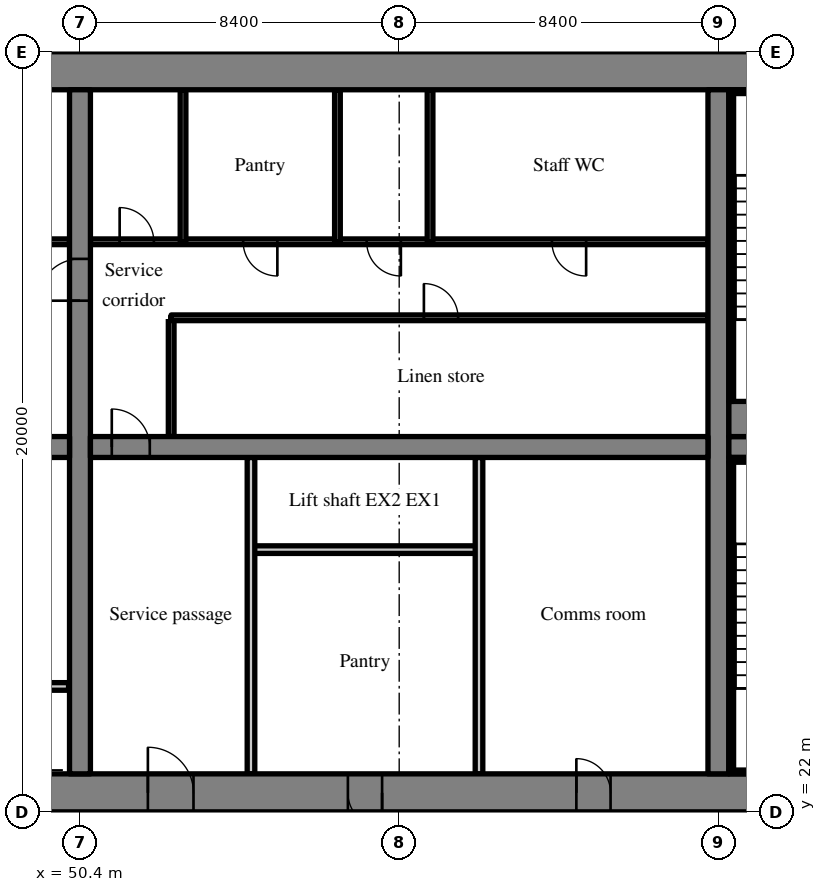
"""IFC4 building model, lengths in metres.
Left out: names, types, materials, properties, quantities, classifications, styles, units other than length and angle.
Written with IfcOpenShell. Run it as: python <this file> out.ifc"""

import sys

from ifc_helpers import new_model, si_unit, direction, frame, frame_2d, origin, place, context, subcontext, project, spatial, rectangle, extrude, source, transform, mapped, element, fill, save


model = new_model("IFC4")
c1 = context("Model", 3, precision=1e-05, world=origin(), true_north=direction((0.0, 1.0)))
c2 = subcontext(c1, "Body", "Model", "MODEL_VIEW")
j1 = project(units=[si_unit("LENGTHUNIT", "METRE"), si_unit("PLANEANGLEUNIT", "RADIAN")], contexts=[c1])
p1 = place(None, origin())
s1 = spatial("IfcSite", under=j1, at=p1, CompositionType="ELEMENT")
p2 = place(p1, origin())
s2 = spatial("IfcBuilding", under=s1, at=p2, CompositionType="ELEMENT")
p3 = place(p2, frame((0.0, 0.0, 73.4)))
s3 = spatial("IfcBuildingStorey", under=s2, at=p3, CompositionType="ELEMENT", Elevation=73.4)
m1 = source(origin(), c2, "Body", "SweptSolid", [
    extrude(rectangle(XDim=50.4, YDim=1.0, at=frame_2d((25.2, 0.0))), origin(), (0.0, 0.0, 1.0), 3.52),
])
p4 = place(p3, frame((25.2, 22.5, 0.0), z_axis=(0.0, 0.0, 1.0), x_axis=(1.0, 0.0, 0.0)))
e1 = element("IfcWall", 1, at=p4, inside=s3, PredefinedType="SHEAR", context=c2, shape_type="MappedRepresentation", body=[
    mapped(m1, transform((0.0, 0.0, 0.0), scale=1.0)),
])
m2 = source(origin(), c2, "Body", "SweptSolid", [
    extrude(rectangle(XDim=1.8, YDim=2.1, at=frame_2d((0.9, 1.05))), frame((0.0, 0.51, 0.0), z_axis=(0.0, -1.0, 0.0), x_axis=(1.0, 0.0, 0.0)), (0.0, 0.0, 1.0), 1.02),
])
p5 = place(p4, frame((15.9, 0.0, 0.0)))
e2 = element("IfcOpeningElement", 2, at=p5, cuts=e1, PredefinedType="OPENING", context=c2, shape_type="MappedRepresentation", body=[
    mapped(m2, transform((0.0, 0.0, 0.0), scale=1.0)),
])
m3 = source(origin(), c2, "Body", "SweptSolid", [
    extrude(rectangle(XDim=1.2, YDim=2.1, at=frame_2d((0.6, 1.05))), frame((0.0, 0.51, 0.0), z_axis=(0.0, -1.0, 0.0), x_axis=(1.0, 0.0, 0.0)), (0.0, 0.0, 1.0), 1.02),
])
p6 = place(p4, frame((26.987, 0.0, 0.0)))
e3 = element("IfcOpeningElement", 3, at=p6, cuts=e1, PredefinedType="OPENING", context=c2, shape_type="MappedRepresentation", body=[
    mapped(m3, transform((0.0, 0.0, 0.0), scale=1.0)),
])
m4 = source(origin(), c2, "Body", "SweptSolid", [
    extrude(rectangle(XDim=0.9, YDim=2.1, at=frame_2d((0.45, 1.05))), frame((0.0, 0.51, 0.0), z_axis=(0.0, -1.0, 0.0), x_axis=(1.0, 0.0, 0.0)), (0.0, 0.0, 1.0), 1.02),
])
p7 = place(p4, frame((32.25, 0.0, 0.0)))
e4 = element("IfcOpeningElement", 4, at=p7, cuts=e1, PredefinedType="OPENING", context=c2, shape_type="MappedRepresentation", body=[
    mapped(m4, transform((0.0, 0.0, 0.0), scale=1.0)),
])
p8 = place(p4, frame((38.262, 0.0, 0.0)))
e5 = element("IfcOpeningElement", 5, at=p8, cuts=e1, PredefinedType="OPENING", context=c2, shape_type="MappedRepresentation", body=[
    mapped(m4, transform((0.0, 0.0, 0.0), scale=1.0)),
])
p9 = place(p4, frame((6.438, 0.0, 0.0)))
e6 = element("IfcOpeningElement", 6, at=p9, cuts=e1, PredefinedType="OPENING", context=c2, shape_type="MappedRepresentation", body=[
    mapped(m3, transform((0.0, 0.0, 0.0), scale=1.0)),
])
p10 = place(p4, frame((47.725, 0.0, 0.0)))
e7 = element("IfcOpeningElement", 7, at=p10, cuts=e1, PredefinedType="OPENING", context=c2, shape_type="MappedRepresentation", body=[
    mapped(m3, transform((0.0, 0.0, 0.0), scale=1.0)),
])
p11 = place(p3, frame((25.2, 41.5, 0.0), z_axis=(0.0, 0.0, 1.0), x_axis=(1.0, 0.0, 0.0)))
e8 = element("IfcWall", 8, at=p11, inside=s3, PredefinedType="SHEAR", context=c2, shape_type="MappedRepresentation", body=[
    mapped(m1, transform((0.0, 0.0, 0.0), scale=1.0)),
])
m5 = source(origin(), c2, "Body", "SweptSolid", [
    extrude(rectangle(XDim=18.0, YDim=0.55, at=frame_2d((9.0, 0.0))), origin(), (0.0, 0.0, 1.0), 3.52),
])
p12 = place(p3, frame((50.4, 23.0, 0.0), z_axis=(0.0, 0.0, 1.0), x_axis=(0.0, 1.0, 0.0)))
e9 = element("IfcWall", 9, at=p12, inside=s3, PredefinedType="SHEAR", context=c2, shape_type="MappedRepresentation", body=[
    mapped(m5, transform((0.0, 0.0, 0.0), scale=1.0)),
])
m6 = source(origin(), c2, "Body", "SweptSolid", [
    extrude(rectangle(XDim=1.1, YDim=2.1, at=frame_2d((0.55, 1.05))), frame((0.0, 0.285, 0.0), z_axis=(0.0, -1.0, 0.0), x_axis=(1.0, 0.0, 0.0)), (0.0, 0.0, 1.0), 0.57),
])
p13 = place(p12, frame((12.45, 0.0, 0.0)))
e10 = element("IfcOpeningElement", 10, at=p13, cuts=e9, PredefinedType="OPENING", context=c2, shape_type="MappedRepresentation", body=[
    mapped(m6, transform((0.0, 0.0, 0.0), scale=1.0)),
])
p14 = place(p3, frame((67.2, 23.0, 0.0), z_axis=(0.0, 0.0, 1.0), x_axis=(0.0, 1.0, 0.0)))
e11 = element("IfcWall", 11, at=p14, inside=s3, PredefinedType="SHEAR", context=c2, shape_type="MappedRepresentation", body=[
    mapped(m5, transform((0.0, 0.0, 0.0), scale=1.0)),
])
m7 = source(origin(), c2, "Body", "SweptSolid", [
    extrude(rectangle(XDim=16.25, YDim=0.55, at=frame_2d((8.125, 0.0))), origin(), (0.0, 0.0, 1.0), 3.52),
])
p15 = place(p3, frame((33.875, 31.6, 0.0), z_axis=(0.0, 0.0, 1.0), x_axis=(1.0, 0.0, 0.0)))
e12 = element("IfcWall", 12, at=p15, inside=s3, PredefinedType="SHEAR", context=c2, shape_type="MappedRepresentation", body=[
    mapped(m7, transform((0.0, 0.0, 0.0), scale=1.0)),
])
m8 = source(origin(), c2, "Body", "SweptSolid", [
    extrude(rectangle(XDim=1.0, YDim=2.1, at=frame_2d((0.5, 1.05))), frame((0.0, 0.285, 0.0), z_axis=(0.0, -1.0, 0.0), x_axis=(1.0, 0.0, 0.0)), (0.0, 0.0, 1.0), 0.57),
])
p16 = place(p15, frame((14.687, 0.0, 0.0)))
e13 = element("IfcOpeningElement", 13, at=p16, cuts=e12, PredefinedType="OPENING", context=c2, shape_type="MappedRepresentation", body=[
    mapped(m8, transform((0.0, 0.0, 0.0), scale=1.0)),
])
p17 = place(p3, frame((50.675, 31.6, 0.0), z_axis=(0.0, 0.0, 1.0), x_axis=(1.0, 0.0, 0.0)))
e14 = element("IfcWall", 14, at=p17, inside=s3, PredefinedType="SHEAR", context=c2, shape_type="MappedRepresentation", body=[
    mapped(m7, transform((0.0, 0.0, 0.0), scale=1.0)),
])
p18 = place(p17, frame((0.562, 0.0, 0.0)))
e15 = element("IfcOpeningElement", 15, at=p18, cuts=e14, PredefinedType="OPENING", context=c2, shape_type="MappedRepresentation", body=[
    mapped(m8, transform((0.0, 0.0, 0.0), scale=1.0)),
])
m9 = source(origin(), c2, "Body", "SweptSolid", [
    extrude(rectangle(XDim=7.125, YDim=0.55, at=frame_2d((3.562, 0.0))), origin(), (0.0, 0.0, 1.0), 3.52),
])
p19 = place(p3, frame((67.475, 31.6, 0.0), z_axis=(0.0, 0.0, 1.0), x_axis=(1.0, 0.0, 0.0)))
e16 = element("IfcWall", 16, at=p19, inside=s3, PredefinedType="SHEAR", context=c2, shape_type="MappedRepresentation", body=[
    mapped(m9, transform((0.0, 0.0, 0.0), scale=1.0)),
])
p20 = place(p19, frame((5.5, 0.0, 0.0)))
e17 = element("IfcOpeningElement", 17, at=p20, cuts=e16, PredefinedType="OPENING", context=c2, shape_type="MappedRepresentation", body=[
    mapped(m6, transform((0.0, 0.0, 0.0), scale=1.0)),
])
m10 = source(origin(), c2, "Body", "SweptSolid", [
    extrude(rectangle(XDim=6.0, YDim=0.2, at=frame_2d((3.0, 0.0))), origin(), (0.0, 0.0, 1.0), 3.52),
])
p21 = place(p3, frame((44.1, 25.3, 0.0), z_axis=(0.0, 0.0, 1.0), x_axis=(1.0, 0.0, 0.0)))
e18 = element("IfcWall", 18, at=p21, inside=s3, PredefinedType="SOLIDWALL", context=c2, shape_type="MappedRepresentation", body=[
    mapped(m10, transform((0.0, 0.0, 0.0), scale=1.0)),
])
m11 = source(origin(), c2, "Body", "SweptSolid", [
    extrude(rectangle(XDim=1.1, YDim=2.1, at=frame_2d((0.55, 1.05))), frame((0.0, 0.11, 0.0), z_axis=(0.0, -1.0, 0.0), x_axis=(1.0, 0.0, 0.0)), (0.0, 0.0, 1.0), 0.22),
])
p22 = place(p21, frame((0.95, 0.0, 0.0)))
e19 = element("IfcOpeningElement", 19, at=p22, cuts=e18, PredefinedType="OPENING", context=c2, shape_type="MappedRepresentation", body=[
    mapped(m11, transform((0.0, 0.0, 0.0), scale=1.0)),
])
p23 = place(p21, frame((3.95, 0.0, 0.0)))
e20 = element("IfcOpeningElement", 20, at=p23, cuts=e18, PredefinedType="OPENING", context=c2, shape_type="MappedRepresentation", body=[
    mapped(m11, transform((0.0, 0.0, 0.0), scale=1.0)),
])
m12 = source(origin(), c2, "Body", "SweptSolid", [
    extrude(rectangle(XDim=16.25, YDim=0.15, at=frame_2d((8.125, 0.0))), origin(), (0.0, 0.0, 1.0), 3.52),
])
p24 = place(p3, frame((33.875, 37.0, 0.0), z_axis=(0.0, 0.0, 1.0), x_axis=(1.0, 0.0, 0.0)))
e21 = element("IfcWall", 21, at=p24, inside=s3, PredefinedType="PARTITIONING", context=c2, shape_type="MappedRepresentation", body=[
    mapped(m12, transform((0.0, 0.0, 0.0), scale=1.0)),
])
m13 = source(origin(), c2, "Body", "SweptSolid", [
    extrude(rectangle(XDim=0.9, YDim=2.1, at=frame_2d((0.45, 1.05))), frame((0.0, 0.085, 0.0), z_axis=(0.0, -1.0, 0.0), x_axis=(1.0, 0.0, 0.0)), (0.0, 0.0, 1.0), 0.17),
])
p25 = place(p24, frame((1.581, 0.0, 0.0)))
e22 = element("IfcOpeningElement", 22, at=p25, cuts=e21, PredefinedType="OPENING", context=c2, shape_type="MappedRepresentation", body=[
    mapped(m13, transform((0.0, 0.0, 0.0), scale=1.0)),
])
p26 = place(p24, frame((7.269, 0.0, 0.0)))
e23 = element("IfcOpeningElement", 23, at=p26, cuts=e21, PredefinedType="OPENING", context=c2, shape_type="MappedRepresentation", body=[
    mapped(m13, transform((0.0, 0.0, 0.0), scale=1.0)),
])
p27 = place(p24, frame((12.144, 0.0, 0.0)))
e24 = element("IfcOpeningElement", 24, at=p27, cuts=e21, PredefinedType="OPENING", context=c2, shape_type="MappedRepresentation", body=[
    mapped(m13, transform((0.0, 0.0, 0.0), scale=1.0)),
])
p28 = place(p24, frame((14.581, 0.0, 0.0)))
e25 = element("IfcOpeningElement", 25, at=p28, cuts=e21, PredefinedType="OPENING", context=c2, shape_type="MappedRepresentation", body=[
    mapped(m13, transform((0.0, 0.0, 0.0), scale=1.0)),
])
p29 = place(p3, frame((60.9, 28.9, 0.0), z_axis=(0.0, 0.0, 1.0), x_axis=(-1.0, 0.0, 0.0)))
e26 = element("IfcWall", 26, at=p29, inside=s3, PredefinedType="SOLIDWALL", context=c2, shape_type="MappedRepresentation", body=[
    mapped(m10, transform((0.0, 0.0, 0.0), scale=1.0)),
])
m14 = source(origin(), c2, "Body", "SweptSolid", [
    extrude(rectangle(XDim=8.325, YDim=0.2, at=frame_2d((4.163, 0.0))), origin(), (0.0, 0.0, 1.0), 3.52),
])
for number, where, z_axis, x_axis in (
    (27, (54.9, 23.0, 0.0), (0.0, 0.0, 1.0), (0.0, 1.0, 0.0)),
    (28, (60.9, 23.0, 0.0), (0.0, 0.0, 1.0), (0.0, 1.0, 0.0)),
):
    element("IfcWall", number, at=place(p3, frame(where, z_axis=z_axis, x_axis=x_axis)), inside=s3, PredefinedType="PARTITIONING", context=c2, shape_type="MappedRepresentation", body=[
        mapped(m14, transform((0.0, 0.0, 0.0), scale=1.0)),
    ])
m15 = source(origin(), c2, "Body", "SweptSolid", [
    extrude(rectangle(XDim=3.125, YDim=0.15, at=frame_2d((1.562, 0.0))), origin(), (0.0, 0.0, 1.0), 3.52),
])
p30 = place(p3, frame((52.8, 31.875, 0.0), z_axis=(0.0, 0.0, 1.0), x_axis=(0.0, 1.0, 0.0)))
e29 = element("IfcWall", 29, at=p30, inside=s3, PredefinedType="PARTITIONING", context=c2, shape_type="MappedRepresentation", body=[
    mapped(m15, transform((0.0, 0.0, 0.0), scale=1.0)),
])
m16 = source(origin(), c2, "Body", "SweptSolid", [
    extrude(rectangle(XDim=14.125, YDim=0.15, at=frame_2d((7.062, 0.0))), origin(), (0.0, 0.0, 1.0), 3.52),
])
p31 = place(p3, frame((66.925, 35.0, 0.0), z_axis=(0.0, 0.0, 1.0), x_axis=(-1.0, 0.0, 0.0)))
e30 = element("IfcWall", 30, at=p31, inside=s3, PredefinedType="PARTITIONING", context=c2, shape_type="MappedRepresentation", body=[
    mapped(m16, transform((0.0, 0.0, 0.0), scale=1.0)),
])
p32 = place(p31, frame((6.575, 0.0, 0.0)))
e31 = element("IfcOpeningElement", 31, at=p32, cuts=e30, PredefinedType="OPENING", context=c2, shape_type="MappedRepresentation", body=[
    mapped(m13, transform((0.0, 0.0, 0.0), scale=1.0)),
])
p33 = place(p3, frame((66.925, 37.0, 0.0), z_axis=(0.0, 0.0, 1.0), x_axis=(-1.0, 0.0, 0.0)))
e32 = element("IfcWall", 32, at=p33, inside=s3, PredefinedType="PARTITIONING", context=c2, shape_type="MappedRepresentation", body=[
    mapped(m12, transform((0.0, 0.0, 0.0), scale=1.0)),
])
p34 = place(p33, frame((3.206, 0.0, 0.0)))
e33 = element("IfcOpeningElement", 33, at=p34, cuts=e32, PredefinedType="OPENING", context=c2, shape_type="MappedRepresentation", body=[
    mapped(m13, transform((0.0, 0.0, 0.0), scale=1.0)),
])
p35 = place(p33, frame((8.081, 0.0, 0.0)))
e34 = element("IfcOpeningElement", 34, at=p35, cuts=e32, PredefinedType="OPENING", context=c2, shape_type="MappedRepresentation", body=[
    mapped(m13, transform((0.0, 0.0, 0.0), scale=1.0)),
])
p36 = place(p33, frame((11.331, 0.0, 0.0)))
e35 = element("IfcOpeningElement", 35, at=p36, cuts=e32, PredefinedType="OPENING", context=c2, shape_type="MappedRepresentation", body=[
    mapped(m13, transform((0.0, 0.0, 0.0), scale=1.0)),
])
p37 = place(p33, frame((14.581, 0.0, 0.0)))
e36 = element("IfcOpeningElement", 36, at=p37, cuts=e32, PredefinedType="OPENING", context=c2, shape_type="MappedRepresentation", body=[
    mapped(m13, transform((0.0, 0.0, 0.0), scale=1.0)),
])
m17 = source(origin(), c2, "Body", "SweptSolid", [
    extrude(rectangle(XDim=4.0, YDim=0.15, at=frame_2d((2.0, 0.0))), origin(), (0.0, 0.0, 1.0), 3.52),
])
for number, where, z_axis, x_axis in (
    (37, (59.612, 37.0, 0.0), (0.0, 0.0, 1.0), (0.0, 1.0, 0.0)),
    (38, (57.175, 37.0, 0.0), (0.0, 0.0, 1.0), (0.0, 1.0, 0.0)),
    (39, (53.112, 37.0, 0.0), (0.0, 0.0, 1.0), (0.0, 1.0, 0.0)),
):
    element("IfcWall", number, at=place(p3, frame(where, z_axis=z_axis, x_axis=x_axis)), inside=s3, PredefinedType="PARTITIONING", context=c2, shape_type="MappedRepresentation", body=[
        mapped(m17, transform((0.0, 0.0, 0.0), scale=1.0)),
    ])
m18 = source(origin(), c2, "Body", "SweptSolid", [
    extrude(rectangle(XDim=4.775, YDim=0.1, at=frame_2d((2.387, 0.0))), origin(), (0.0, 0.0, 1.0), 3.52),
])
p38 = place(p3, frame((67.475, 23.05, 0.0), z_axis=(0.0, 0.0, 1.0), x_axis=(1.0, 0.0, 0.0)))
e40 = element("IfcWall", 40, at=p38, inside=s3, PredefinedType="SOLIDWALL", context=c2, shape_type="MappedRepresentation", body=[
    mapped(m18, transform((0.0, 0.0, 0.0), scale=1.0)),
])
m19 = source(origin(), c2, "Body", "SweptSolid", [
    extrude(rectangle(XDim=4.775, YDim=0.125, at=frame_2d((2.387, 0.0))), origin(), (0.0, 0.0, 1.0), 3.52),
])
p39 = place(p3, frame((67.475, 31.262, 0.0), z_axis=(0.0, 0.0, 1.0), x_axis=(1.0, 0.0, 0.0)))
e41 = element("IfcWall", 41, at=p39, inside=s3, PredefinedType="SOLIDWALL", context=c2, shape_type="MappedRepresentation", body=[
    mapped(m19, transform((0.0, 0.0, 0.0), scale=1.0)),
])
m20 = source(origin(), c2, "Body", "SweptSolid", [
    extrude(rectangle(XDim=8.1, YDim=0.125, at=frame_2d((4.05, 0.0))), origin(), (0.0, 0.0, 1.0), 3.52),
])
p40 = place(p3, frame((67.537, 23.1, 0.0), z_axis=(0.0, 0.0, 1.0), x_axis=(0.0, 1.0, 0.0)))
e42 = element("IfcWall", 42, at=p40, inside=s3, PredefinedType="SOLIDWALL", context=c2, shape_type="MappedRepresentation", body=[
    mapped(m20, transform((0.0, 0.0, 0.0), scale=1.0)),
])
p41 = place(p3, frame((67.475, 40.95, 0.0), z_axis=(0.0, 0.0, 1.0), x_axis=(1.0, 0.0, 0.0)))
e43 = element("IfcWall", 43, at=p41, inside=s3, PredefinedType="SOLIDWALL", context=c2, shape_type="MappedRepresentation", body=[
    mapped(m18, transform((0.0, 0.0, 0.0), scale=1.0)),
])
m21 = source(origin(), c2, "Body", "SweptSolid", [
    extrude(rectangle(XDim=4.775, YDim=0.925, at=frame_2d((2.387, 0.0))), origin(), (0.0, 0.0, 1.0), 3.52),
])
p42 = place(p3, frame((67.475, 32.337, 0.0), z_axis=(0.0, 0.0, 1.0), x_axis=(1.0, 0.0, 0.0)))
e44 = element("IfcWall", 44, at=p42, inside=s3, PredefinedType="SOLIDWALL", context=c2, shape_type="MappedRepresentation", body=[
    mapped(m21, transform((0.0, 0.0, 0.0), scale=1.0)),
])
p43 = place(p3, frame((67.537, 32.8, 0.0), z_axis=(0.0, 0.0, 1.0), x_axis=(0.0, 1.0, 0.0)))
e45 = element("IfcWall", 45, at=p43, inside=s3, PredefinedType="SOLIDWALL", context=c2, shape_type="MappedRepresentation", body=[
    mapped(m20, transform((0.0, 0.0, 0.0), scale=1.0)),
])
m22 = source(origin(), c2, "Body", "SweptSolid", [
    extrude(rectangle(XDim=1.2, YDim=2.1, at=frame_2d((0.6, 1.05))), frame((0.0, 0.375, 0.0), z_axis=(0.0, -1.0, 0.0), x_axis=(1.0, 0.0, 0.0)), (0.0, 0.0, 1.0), 0.05),
])
p44 = place(p6, origin())
e46 = element("IfcDoor", 46, at=p44, inside=s3, OperationType="SINGLE_SWING_LEFT", PredefinedType="DOOR", context=c2, shape_type="MappedRepresentation", body=[
    mapped(m22, transform((0.0, 0.0, 0.0), scale=1.0)),
])
fill(e3, e46)
m23 = source(origin(), c2, "Body", "SweptSolid", [
    extrude(rectangle(XDim=1.0, YDim=2.1, at=frame_2d((0.5, 1.05))), frame((0.0, 0.025, 0.0), z_axis=(0.0, -1.0, 0.0), x_axis=(1.0, 0.0, 0.0)), (0.0, 0.0, 1.0), 0.05),
])
p45 = place(p18, origin())
e47 = element("IfcDoor", 47, at=p45, inside=s3, OperationType="SINGLE_SWING_LEFT", PredefinedType="DOOR", context=c2, shape_type="MappedRepresentation", body=[
    mapped(m23, transform((0.0, 0.0, 0.0), scale=1.0)),
])
fill(e15, e47)
m24 = source(origin(), c2, "Body", "SweptSolid", [
    extrude(rectangle(XDim=0.9, YDim=2.1, at=frame_2d((0.45, 1.05))), frame((0.0, 0.375, 0.0), z_axis=(0.0, -1.0, 0.0), x_axis=(1.0, 0.0, 0.0)), (0.0, 0.0, 1.0), 0.05),
])
p46 = place(p7, origin())
e48 = element("IfcDoor", 48, at=p46, inside=s3, OperationType="SINGLE_SWING_RIGHT", PredefinedType="DOOR", context=c2, shape_type="MappedRepresentation", body=[
    mapped(m24, transform((0.0, 0.0, 0.0), scale=1.0)),
])
fill(e4, e48)
p47 = place(p8, origin())
e49 = element("IfcDoor", 49, at=p47, inside=s3, OperationType="SINGLE_SWING_LEFT", PredefinedType="DOOR", context=c2, shape_type="MappedRepresentation", body=[
    mapped(m24, transform((0.0, 0.0, 0.0), scale=1.0)),
])
fill(e5, e49)
m25 = source(origin(), c2, "Body", "SweptSolid", [
    extrude(rectangle(XDim=0.9, YDim=2.1, at=frame_2d((0.45, 1.05))), frame((0.0, 0.025, 0.0), z_axis=(0.0, -1.0, 0.0), x_axis=(1.0, 0.0, 0.0)), (0.0, 0.0, 1.0), 0.05),
])
p48 = place(p32, origin())
e50 = element("IfcDoor", 50, at=p48, inside=s3, OperationType="SINGLE_SWING_RIGHT", PredefinedType="DOOR", context=c2, shape_type="MappedRepresentation", body=[
    mapped(m25, transform((0.0, 0.0, 0.0), scale=1.0)),
])
fill(e31, e50)
p49 = place(p34, origin())
e51 = element("IfcDoor", 51, at=p49, inside=s3, OperationType="SINGLE_SWING_LEFT", PredefinedType="DOOR", context=c2, shape_type="MappedRepresentation", body=[
    mapped(m25, transform((0.0, 0.0, 0.0), scale=1.0)),
])
fill(e33, e51)
p50 = place(p35, origin())
e52 = element("IfcDoor", 52, at=p50, inside=s3, OperationType="SINGLE_SWING_LEFT", PredefinedType="DOOR", context=c2, shape_type="MappedRepresentation", body=[
    mapped(m25, transform((0.0, 0.0, 0.0), scale=1.0)),
])
fill(e34, e52)
p51 = place(p36, origin())
e53 = element("IfcDoor", 53, at=p51, inside=s3, OperationType="SINGLE_SWING_LEFT", PredefinedType="DOOR", context=c2, shape_type="MappedRepresentation", body=[
    mapped(m25, transform((0.0, 0.0, 0.0), scale=1.0)),
])
fill(e35, e53)
p52 = place(p37, origin())
e54 = element("IfcDoor", 54, at=p52, inside=s3, OperationType="SINGLE_SWING_RIGHT", PredefinedType="DOOR", context=c2, shape_type="MappedRepresentation", body=[
    mapped(m25, transform((0.0, 0.0, 0.0), scale=1.0)),
])
fill(e36, e54)
m26 = source(origin(), c2, "Body", "SweptSolid", [
    extrude(rectangle(XDim=1.1, YDim=2.1, at=frame_2d((0.55, 1.05))), frame((0.0, 0.025, 0.0), z_axis=(0.0, -1.0, 0.0), x_axis=(1.0, 0.0, 0.0)), (0.0, 0.0, 1.0), 0.05),
])
p53 = place(p13, origin())
e55 = element("IfcDoor", 55, at=p53, inside=s3, OperationType="SINGLE_SWING_LEFT", PredefinedType="DOOR", context=c2, shape_type="MappedRepresentation", body=[
    mapped(m26, transform((0.0, 0.0, 0.0), scale=1.0)),
])
fill(e10, e55)
save(model, sys.argv[1])
